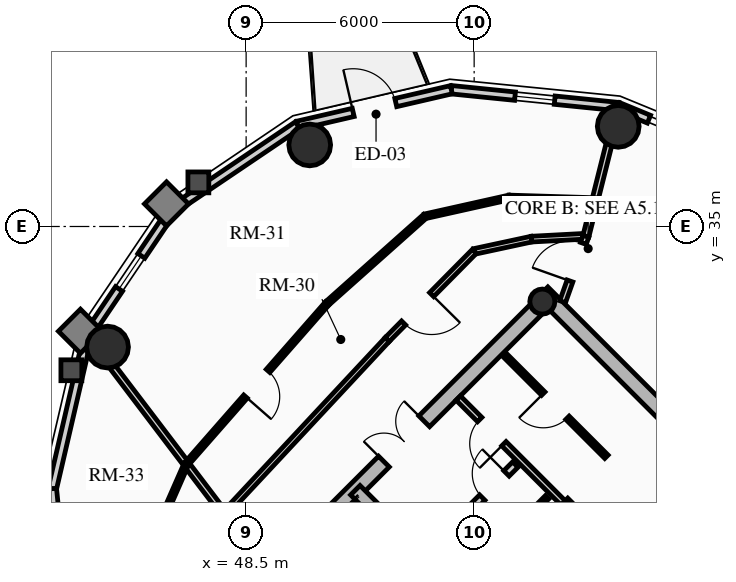
"""IFC4 building model, lengths in metres.
Left out: names, types, materials, properties, quantities, classifications, styles, units other than length and angle.
Written with IfcOpenShell. Run it as: python <this file> out.ifc"""

import sys

from ifc_helpers import new_model, si_unit, direction, frame, frame_2d, origin, origin_2d, place, context, subcontext, project, spatial, rectangle, circle, hollow_circle, extrude, source, transform, mapped, element, fill, save


model = new_model("IFC4")
c1 = context("Model", 3, precision=1e-05, world=origin(), true_north=direction((0.0, 1.0)))
c2 = subcontext(c1, "Body", "Model", "MODEL_VIEW")
j1 = project(units=[si_unit("LENGTHUNIT", "METRE"), si_unit("PLANEANGLEUNIT", "RADIAN")], contexts=[c1])
p1 = place(None, origin())
s1 = spatial("IfcSite", under=j1, at=p1, CompositionType="ELEMENT")
p2 = place(p1, origin())
s2 = spatial("IfcBuilding", under=s1, at=p2, CompositionType="ELEMENT")
p3 = place(p2, frame((0.0, 0.0, 226.05)))
s3 = spatial("IfcBuildingStorey", under=s2, at=p3, CompositionType="ELEMENT", Elevation=226.05)
p4 = place(p3, frame((66.268, 23.298, 0.0), z_axis=(0.0, 0.0, 1.0), x_axis=(-0.707106781187, 0.707106781187, 0.0)))
e1 = element("IfcWall", 1, at=p4, inside=s3, PredefinedType="SHEAR", context=c2, shape_type="SweptSolid", body=[
    extrude(rectangle(XDim=14.1, YDim=0.4, at=frame_2d((7.05, 0.0))), origin(), (0.0, 0.0, 1.0), 3.2),
])
p5 = place(p3, frame((48.873, 25.561, 0.0), z_axis=(0.0, 0.0, 1.0), x_axis=(0.707106781187, 0.707106781187, 0.0)))
e2 = element("IfcWall", 2, at=p5, inside=s3, PredefinedType="SHEAR", context=c2, shape_type="SweptSolid", body=[
    extrude(rectangle(XDim=10.7, YDim=0.4, at=frame_2d((5.35, 0.0))), origin(), (0.0, 0.0, 1.0), 3.2),
])
m1 = source(origin(), c2, "Body", "SweptSolid", [
    extrude(rectangle(XDim=1.5, YDim=2.02, at=frame_2d((0.75, 1.01))), frame((0.0, 0.21, 0.0), z_axis=(0.0, -1.0, 0.0), x_axis=(1.0, 0.0, 0.0)), (0.0, 0.0, 1.0), 0.42),
])
p6 = place(p5, frame((4.6, 0.0, 0.0)))
e3 = element("IfcOpeningElement", 3, at=p6, cuts=e2, PredefinedType="OPENING", context=c2, shape_type="MappedRepresentation", body=[
    mapped(m1, transform((0.0, 0.0, 0.0), x_axis=(1.0, 0.0, 0.0), y_axis=(0.0, 1.0, 0.0), z_axis=(0.0, 0.0, 1.0), scale=1.0)),
])
p7 = place(p3, frame((61.06, 18.373, 0.0), z_axis=(0.0, 0.0, 1.0), x_axis=(-0.707106781187, 0.707106781187, 0.0)))
e4 = element("IfcWall", 4, at=p7, inside=s3, PredefinedType="SHEAR", context=c2, shape_type="SweptSolid", body=[
    extrude(rectangle(XDim=13.7, YDim=0.35, at=frame_2d((6.85, 0.0))), origin(), (0.0, 0.0, 1.0), 3.2),
])
m2 = source(origin(), c2, "Body", "SweptSolid", [
    extrude(rectangle(XDim=1.1, YDim=2.015, at=frame_2d((0.55, 1.007))), frame((0.0, 0.185, 0.0), z_axis=(0.0, -1.0, 0.0), x_axis=(1.0, 0.0, 0.0)), (0.0, 0.0, 1.0), 0.37),
])
p8 = place(p7, frame((4.85, 0.0, 0.0)))
e5 = element("IfcOpeningElement", 5, at=p8, cuts=e4, PredefinedType="OPENING", context=c2, shape_type="MappedRepresentation", body=[
    mapped(m2, transform((0.0, 0.0, 0.0), x_axis=(1.0, 0.0, 0.0), y_axis=(0.0, 1.0, 0.0), z_axis=(0.0, 0.0, 1.0), scale=1.0)),
])
p9 = place(p7, frame((0.625, 0.0, 0.0)))
e6 = element("IfcOpeningElement", 6, at=p9, cuts=e4, PredefinedType="OPENING", context=c2, shape_type="MappedRepresentation", body=[
    mapped(m2, transform((0.0, 0.0, 0.0), x_axis=(1.0, 0.0, 0.0), y_axis=(0.0, 1.0, 0.0), z_axis=(0.0, 0.0, 1.0), scale=1.0)),
])
p10 = place(p7, frame((2.625, 0.0, 0.0)))
e7 = element("IfcOpeningElement", 7, at=p10, cuts=e4, PredefinedType="OPENING", context=c2, shape_type="MappedRepresentation", body=[
    mapped(m2, transform((0.0, 0.0, 0.0), x_axis=(1.0, 0.0, 0.0), y_axis=(0.0, 1.0, 0.0), z_axis=(0.0, 0.0, 1.0), scale=1.0)),
])
m3 = source(origin(), c2, "Body", "SweptSolid", [
    extrude(rectangle(XDim=1.15, YDim=2.02, at=frame_2d((0.575, 1.01))), frame((0.0, 0.185, 0.0), z_axis=(0.0, -1.0, 0.0), x_axis=(1.0, 0.0, 0.0)), (0.0, 0.0, 1.0), 0.37),
])
p11 = place(p7, frame((7.27, 0.0, 0.0)))
e8 = element("IfcOpeningElement", 8, at=p11, cuts=e4, PredefinedType="OPENING", context=c2, shape_type="MappedRepresentation", body=[
    mapped(m3, transform((0.0, 0.0, 0.0), x_axis=(1.0, 0.0, 0.0), y_axis=(0.0, 1.0, 0.0), z_axis=(0.0, 0.0, 1.0), scale=1.0)),
])
p12 = place(p3, frame((63.627, 20.94, 0.0), z_axis=(0.0, 0.0, 1.0), x_axis=(-0.707119496762, 0.707094065383, 0.0)))
e9 = element("IfcWall", 9, at=p12, inside=s3, PredefinedType="SHEAR", context=c2, shape_type="SweptSolid", body=[
    extrude(rectangle(XDim=9.6, YDim=0.35, at=frame_2d((4.8, 0.0))), origin(), (0.0, 0.0, 1.0), 3.2),
])
p13 = place(p12, frame((5.28, 0.0, 0.0)))
e10 = element("IfcOpeningElement", 10, at=p13, cuts=e9, PredefinedType="OPENING", context=c2, shape_type="MappedRepresentation", body=[
    mapped(m3, transform((0.0, 0.0, 0.0), x_axis=(1.0, 0.0, 0.0), y_axis=(0.0, 1.0, 0.0), z_axis=(0.0, 0.0, 1.0), scale=1.0)),
])
p14 = place(p3, frame((58.893, 25.674, 0.0), z_axis=(0.0, 0.0, 1.0), x_axis=(0.707106781187, 0.707106781187, 0.0)))
e11 = element("IfcWall", 11, at=p14, inside=s3, PredefinedType="SHEAR", context=c2, shape_type="SweptSolid", body=[
    extrude(rectangle(XDim=3.285, YDim=0.35, at=frame_2d((1.643, 0.0))), origin(), (0.0, 0.0, 1.0), 3.2),
])
p15 = place(p3, frame((56.294, 33.024, 0.0), z_axis=(0.0, 0.0, 1.0), x_axis=(0.707106781187, 0.707106781187, 0.0)))
e12 = element("IfcColumn", 12, at=p15, inside=s3, PredefinedType="COLUMN", context=c2, shape_type="SweptSolid", body=[
    extrude(hollow_circle(Radius=0.33, WallThickness=0.025, at=origin_2d()), origin(), (0.0, 0.0, 1.0), 3.2),
])
for number, where, z_axis, x_axis in (
    (13, (58.291, 37.635, 0.0), (0.0, 0.0, 1.0), (1.0, 0.0, 0.0)),
    (14, (50.173, 37.146, 0.0), (0.0, 0.0, 1.0), (1.0, 0.0, 0.0)),
    (15, (44.854, 31.827, 0.0), (0.0, 0.0, 1.0), (1.0, 0.0, 0.0)),
):
    element("IfcColumn", number, at=place(p3, frame(where, z_axis=z_axis, x_axis=x_axis)), inside=s3, PredefinedType="USERDEFINED", context=c2, shape_type="SweptSolid", body=[
        extrude(circle(Radius=0.55, at=origin_2d()), origin(), (0.0, 0.0, 1.0), 3.2),
    ])
p16 = place(p3, frame((58.295, 38.155, 0.0), z_axis=(0.0, 0.0, 1.0), x_axis=(0.924515260676, -0.381145028536, 0.0)))
e16 = element("IfcWall", 16, at=p16, inside=s3, PredefinedType="SOLIDWALL", context=c2, shape_type="SweptSolid", body=[
    extrude(rectangle(XDim=0.87, YDim=0.22, at=frame_2d((0.435, 0.0))), origin(), (0.0, 0.0, 1.0), 2.612),
])
p17 = place(p3, frame((53.9, 38.599, 0.0), z_axis=(0.0, 0.0, 1.0), x_axis=(0.994929930991, -0.100570534541, 0.0)))
e17 = element("IfcWall", 17, at=p17, inside=s3, PredefinedType="SOLIDWALL", context=c2, shape_type="SweptSolid", body=[
    extrude(rectangle(XDim=4.418, YDim=0.22, at=frame_2d((2.209, 0.0))), origin(), (0.0, 0.0, 1.0), 2.612),
])
m4 = source(origin(), c2, "Body", "SweptSolid", [
    extrude(rectangle(XDim=1.05, YDim=1.3, at=frame_2d((0.525, 0.65))), frame((0.0, 0.12, 0.0), z_axis=(0.0, -1.0, 0.0), x_axis=(1.0, 0.0, 0.0)), (0.0, 0.0, 1.0), 0.24),
])
p18 = place(p17, frame((1.684, 0.0, 0.65)))
e18 = element("IfcOpeningElement", 18, at=p18, cuts=e17, PredefinedType="OPENING", context=c2, shape_type="MappedRepresentation", body=[
    mapped(m4, transform((0.0, 0.0, 0.0), x_axis=(1.0, 0.0, 0.0), y_axis=(0.0, 1.0, 0.0), z_axis=(0.0, 0.0, 1.0), scale=1.0)),
])
p19 = place(p3, frame((49.856, 37.663, 0.0), z_axis=(0.0, 0.0, 1.0), x_axis=(0.974249228678, 0.225473813158, 0.0)))
e19 = element("IfcWall", 19, at=p19, inside=s3, PredefinedType="SOLIDWALL", context=c2, shape_type="SweptSolid", body=[
    extrude(rectangle(XDim=4.15, YDim=0.22, at=frame_2d((2.075, 0.0))), origin(), (0.0, 0.0, 1.0), 2.612),
])
m5 = source(origin(), c2, "Body", "SweptSolid", [
    extrude(rectangle(XDim=1.15, YDim=2.005, at=frame_2d((0.575, 1.002))), frame((0.0, 0.12, 0.0), z_axis=(0.0, -1.0, 0.0), x_axis=(1.0, 0.0, 0.0)), (0.0, 0.0, 1.0), 0.24),
])
p20 = place(p19, frame((1.5, 0.0, 0.0)))
e20 = element("IfcOpeningElement", 20, at=p20, cuts=e19, PredefinedType="OPENING", context=c2, shape_type="MappedRepresentation", body=[
    mapped(m5, transform((0.0, 0.0, 0.0), x_axis=(1.0, 0.0, 0.0), y_axis=(0.0, 1.0, 0.0), z_axis=(0.0, 0.0, 1.0), scale=1.0)),
])
p21 = place(p3, frame((46.561, 35.439, 0.0), z_axis=(0.0, 0.0, 1.0), x_axis=(0.828833723692, 0.559495003079, 0.0)))
e21 = element("IfcWall", 21, at=p21, inside=s3, PredefinedType="SOLIDWALL", context=c2, shape_type="SweptSolid", body=[
    extrude(rectangle(XDim=3.976, YDim=0.22, at=frame_2d((1.988, 0.0))), origin(), (0.0, 0.0, 1.0), 2.612),
])
p22 = place(p3, frame((44.337, 32.144, 0.0), z_axis=(0.0, 0.0, 1.0), x_axis=(0.559495003079, 0.828833723692, 0.0)))
e22 = element("IfcWall", 22, at=p22, inside=s3, PredefinedType="SOLIDWALL", context=c2, shape_type="SweptSolid", body=[
    extrude(rectangle(XDim=3.976, YDim=0.22, at=frame_2d((1.988, 0.0))), origin(), (0.0, 0.0, 1.0), 2.612),
])
p23 = place(p22, frame((1.463, 0.0, 0.65)))
e23 = element("IfcOpeningElement", 23, at=p23, cuts=e22, PredefinedType="OPENING", context=c2, shape_type="MappedRepresentation", body=[
    mapped(m4, transform((0.0, 0.0, 0.0), x_axis=(1.0, 0.0, 0.0), y_axis=(0.0, 1.0, 0.0), z_axis=(0.0, 0.0, 1.0), scale=1.0)),
])
p24 = place(p3, frame((43.401, 28.1, 0.0), z_axis=(0.0, 0.0, 1.0), x_axis=(0.225473813158, 0.974249228678, 0.0)))
e24 = element("IfcWall", 24, at=p24, inside=s3, PredefinedType="SOLIDWALL", context=c2, shape_type="SweptSolid", body=[
    extrude(rectangle(XDim=4.15, YDim=0.22, at=frame_2d((2.075, 0.0))), origin(), (0.0, 0.0, 1.0), 2.612),
])
p25 = place(p3, frame((43.845, 23.705, 0.0), z_axis=(0.0, 0.0, 1.0), x_axis=(-0.100570534541, 0.994929930991, 0.0)))
e25 = element("IfcWall", 25, at=p25, inside=s3, PredefinedType="SOLIDWALL", context=c2, shape_type="SweptSolid", body=[
    extrude(rectangle(XDim=4.418, YDim=0.22, at=frame_2d((2.209, 0.0))), origin(), (0.0, 0.0, 1.0), 2.612),
])
p26 = place(p25, frame((1.684, 0.0, 0.65)))
e26 = element("IfcOpeningElement", 26, at=p26, cuts=e25, PredefinedType="OPENING", context=c2, shape_type="MappedRepresentation", body=[
    mapped(m4, transform((0.0, 0.0, 0.0), x_axis=(1.0, 0.0, 0.0), y_axis=(0.0, 1.0, 0.0), z_axis=(0.0, 0.0, 1.0), scale=1.0)),
])
p27 = place(p3, frame((53.264, 26.416, 0.0), z_axis=(0.0, 0.0, 1.0), x_axis=(0.707106781187, 0.707106781187, 0.0)))
e27 = element("IfcWall", 27, at=p27, inside=s3, PredefinedType="PARTITIONING", context=c2, shape_type="SweptSolid", body=[
    extrude(rectangle(XDim=3.28, YDim=0.2, at=frame_2d((1.64, 0.0))), origin(), (0.0, 0.0, 1.0), 2.975),
])
m6 = source(origin(), c2, "Body", "SweptSolid", [
    extrude(rectangle(XDim=1.0, YDim=2.015, at=frame_2d((0.5, 1.007))), frame((0.0, 0.11, 0.0), z_axis=(0.0, -1.0, 0.0), x_axis=(1.0, 0.0, 0.0)), (0.0, 0.0, 1.0), 0.22),
])
p28 = place(p27, frame((0.14, 0.0, 0.0)))
e28 = element("IfcOpeningElement", 28, at=p28, cuts=e27, PredefinedType="OPENING", context=c2, shape_type="MappedRepresentation", body=[
    mapped(m6, transform((0.0, 0.0, 0.0), x_axis=(1.0, 0.0, 0.0), y_axis=(0.0, 1.0, 0.0), z_axis=(0.0, 0.0, 1.0), scale=1.0)),
])
m7 = source(origin(), c2, "Body", "SweptSolid", [
    extrude(rectangle(XDim=0.9, YDim=2.005, at=frame_2d((0.45, 1.002))), frame((0.0, 0.11, 0.0), z_axis=(0.0, -1.0, 0.0), x_axis=(1.0, 0.0, 0.0)), (0.0, 0.0, 1.0), 0.22),
])
p29 = place(p27, frame((2.05, 0.0, 0.0)))
e29 = element("IfcOpeningElement", 29, at=p29, cuts=e27, PredefinedType="OPENING", context=c2, shape_type="MappedRepresentation", body=[
    mapped(m7, transform((0.0, 0.0, 0.0), x_axis=(1.0, 0.0, 0.0), y_axis=(0.0, 1.0, 0.0), z_axis=(0.0, 0.0, 1.0), scale=1.0)),
])
p30 = place(p3, frame((55.089, 26.543, 0.0), z_axis=(0.0, 0.0, 1.0), x_axis=(0.707106781187, 0.707106781187, 0.0)))
e30 = element("IfcWall", 30, at=p30, inside=s3, PredefinedType="PARTITIONING", context=c2, shape_type="SweptSolid", body=[
    extrude(rectangle(XDim=1.88, YDim=0.125, at=frame_2d((0.94, 0.0))), origin(), (0.0, 0.0, 1.0), 2.975),
])
p31 = place(p3, frame((56.839, 27.728, 0.0), z_axis=(0.0, 0.0, 1.0), x_axis=(-0.707106781187, 0.707106781187, 0.0)))
e31 = element("IfcWall", 31, at=p31, inside=s3, PredefinedType="PARTITIONING", context=c2, shape_type="SweptSolid", body=[
    extrude(rectangle(XDim=3.9, YDim=0.16, at=frame_2d((1.95, 0.0))), origin(), (0.0, 0.0, 1.0), 2.975),
])
m8 = source(origin(), c2, "Body", "SweptSolid", [
    extrude(rectangle(XDim=0.9, YDim=2.005, at=frame_2d((0.45, 1.002))), frame((0.0, 0.09, 0.0), z_axis=(0.0, -1.0, 0.0), x_axis=(1.0, 0.0, 0.0)), (0.0, 0.0, 1.0), 0.18),
])
p32 = place(p31, frame((2.2, 0.0, 0.0)))
e32 = element("IfcOpeningElement", 32, at=p32, cuts=e31, PredefinedType="OPENING", context=c2, shape_type="MappedRepresentation", body=[
    mapped(m8, transform((0.0, 0.0, 0.0), x_axis=(1.0, 0.0, 0.0), y_axis=(0.0, 1.0, 0.0), z_axis=(0.0, 0.0, 1.0), scale=1.0)),
])
p33 = place(p3, frame((57.981, 28.941, 0.0), z_axis=(0.0, 0.0, 1.0), x_axis=(-0.707074823725, 0.707138737204, 0.0)))
e33 = element("IfcWall", 33, at=p33, inside=s3, PredefinedType="PARTITIONING", context=c2, shape_type="SweptSolid", body=[
    extrude(rectangle(XDim=3.82, YDim=0.125, at=frame_2d((1.91, 0.0))), origin(), (0.0, 0.0, 1.0), 2.975),
])
m9 = source(origin(), c2, "Body", "SweptSolid", [
    extrude(rectangle(XDim=0.9, YDim=2.005, at=frame_2d((0.45, 1.002))), frame((0.0, 0.073, 0.0), z_axis=(0.0, -1.0, 0.0), x_axis=(1.0, 0.0, 0.0)), (0.0, 0.0, 1.0), 0.145),
])
p34 = place(p33, frame((1.45, 0.0, 0.0)))
e34 = element("IfcOpeningElement", 34, at=p34, cuts=e33, PredefinedType="OPENING", context=c2, shape_type="MappedRepresentation", body=[
    mapped(m9, transform((0.0, 0.0, 0.0), x_axis=(1.0, 0.0, 0.0), y_axis=(0.0, 1.0, 0.0), z_axis=(0.0, 0.0, 1.0), scale=1.0)),
])
p35 = place(p3, frame((57.44, 34.744, 0.0), z_axis=(0.0, 0.0, 1.0), x_axis=(-0.998578025565, -0.053309725738, 0.0)))
e35 = element("IfcWall", 35, at=p35, inside=s3, PredefinedType="PARTITIONING", context=c2, shape_type="SweptSolid", body=[
    extrude(rectangle(XDim=1.433, YDim=0.15, at=frame_2d((0.717, 0.0))), origin(), (0.0, 0.0, 1.0), 2.612),
])
p36 = place(p3, frame((56.009, 34.667, 0.0), z_axis=(0.0, 0.0, 1.0), x_axis=(-0.977625498152, -0.210353001795, 0.0)))
e36 = element("IfcWall", 36, at=p36, inside=s3, PredefinedType="PARTITIONING", context=c2, shape_type="SweptSolid", body=[
    extrude(rectangle(XDim=1.538, YDim=0.15, at=frame_2d((0.769, 0.0))), origin(), (0.0, 0.0, 1.0), 2.545),
])
p37 = place(p3, frame((54.506, 34.344, 0.0), z_axis=(0.0, 0.0, 1.0), x_axis=(-0.703053402247, -0.711137056824, 0.0)))
e37 = element("IfcWall", 37, at=p37, inside=s3, PredefinedType="PARTITIONING", context=c2, shape_type="SweptSolid", body=[
    extrude(rectangle(XDim=3.262, YDim=0.15, at=frame_2d((1.631, 0.0))), origin(), (0.0, 0.0, 1.0), 2.612),
])
m10 = source(origin(), c2, "Body", "SweptSolid", [
    extrude(rectangle(XDim=1.05, YDim=2.015, at=frame_2d((0.525, 1.007))), frame((0.0, 0.085, 0.0), z_axis=(0.0, -1.0, 0.0), x_axis=(1.0, 0.0, 0.0)), (0.0, 0.0, 1.0), 0.17),
])
p38 = place(p37, frame((1.599, 0.0, 0.0)))
e38 = element("IfcOpeningElement", 38, at=p38, cuts=e37, PredefinedType="OPENING", context=c2, shape_type="MappedRepresentation", body=[
    mapped(m10, transform((0.0, 0.0, 0.0), x_axis=(1.0, 0.0, 0.0), y_axis=(0.0, 1.0, 0.0), z_axis=(0.0, 0.0, 1.0), scale=1.0)),
])
p39 = place(p3, frame((52.212, 32.024, 0.0), z_axis=(0.0, 0.0, 1.0), x_axis=(-0.682158998173, -0.731203871169, 0.0)))
e39 = element("IfcWall", 39, at=p39, inside=s3, PredefinedType="PARTITIONING", context=c2, shape_type="SweptSolid", body=[
    extrude(rectangle(XDim=6.282, YDim=0.15, at=frame_2d((3.141, 0.0))), origin(), (0.0, 0.0, 1.0), 2.545),
])
p40 = place(p3, frame((57.44, 34.744, 0.0), z_axis=(0.0, 0.0, 1.0), x_axis=(0.243619816457, 0.969870808422, 0.0)))
e40 = element("IfcWall", 40, at=p40, inside=s3, PredefinedType="PARTITIONING", context=c2, shape_type="SweptSolid", body=[
    extrude(rectangle(XDim=3.496, YDim=0.16, at=frame_2d((1.748, 0.0))), origin(), (0.0, 0.0, 1.0), 2.612),
])
p41 = place(p3, frame((47.927, 27.431, 0.0), z_axis=(0.0, 0.0, 1.0), x_axis=(-0.604823333103, 0.796359677366, 0.0)))
e41 = element("IfcWall", 41, at=p41, inside=s3, PredefinedType="PARTITIONING", context=c2, shape_type="SweptSolid", body=[
    extrude(rectangle(XDim=5.907, YDim=0.16, at=frame_2d((2.953, 0.0))), origin(), (0.0, 0.0, 1.0), 2.612),
])
p42 = place(p3, frame((56.828, 33.021, 0.0), z_axis=(0.0, 0.0, 1.0), x_axis=(0.334788446034, 0.942293317605, 0.0)))
e42 = element("IfcWall", 42, at=p42, inside=s3, PredefinedType="PARTITIONING", context=c2, shape_type="SweptSolid", body=[
    extrude(rectangle(XDim=1.829, YDim=0.16, at=frame_2d((0.915, 0.0))), origin(), (0.0, 0.0, 1.0), 2.545),
])
m11 = source(origin(), c2, "Body", "SweptSolid", [
    extrude(rectangle(XDim=1.05, YDim=2.015, at=frame_2d((0.525, 1.007))), frame((0.0, 0.09, 0.0), z_axis=(0.0, -1.0, 0.0), x_axis=(1.0, 0.0, 0.0)), (0.0, 0.0, 1.0), 0.18),
])
p43 = place(p42, frame((0.579, 0.0, 0.0)))
e43 = element("IfcOpeningElement", 43, at=p43, cuts=e42, PredefinedType="OPENING", context=c2, shape_type="MappedRepresentation", body=[
    mapped(m11, transform((0.0, 0.0, 0.0), x_axis=(1.0, 0.0, 0.0), y_axis=(0.0, 1.0, 0.0), z_axis=(0.0, 0.0, 1.0), scale=1.0)),
])
p44 = place(p3, frame((57.679, 35.693, 0.0), z_axis=(0.0, 0.0, 1.0), x_axis=(-0.999526298938, 0.030776252722, 0.0)))
e44 = element("IfcWall", 44, at=p44, inside=s3, PredefinedType="PARTITIONING", context=c2, shape_type="SweptSolid", body=[
    extrude(rectangle(XDim=2.261, YDim=0.125, at=frame_2d((1.13, 0.0))), origin(), (0.0, 0.0, 1.0), 2.612),
])
p45 = place(p3, frame((55.419, 35.763, 0.0), z_axis=(0.0, 0.0, 1.0), x_axis=(-0.975917771425, -0.218138725166, 0.0)))
e45 = element("IfcWall", 45, at=p45, inside=s3, PredefinedType="PARTITIONING", context=c2, shape_type="SweptSolid", body=[
    extrude(rectangle(XDim=2.268, YDim=0.125, at=frame_2d((1.134, 0.0))), origin(), (0.0, 0.0, 1.0), 2.545),
])
p46 = place(p3, frame((53.206, 35.268, 0.0), z_axis=(0.0, 0.0, 1.0), x_axis=(-0.746677760999, -0.665185929819, 0.0)))
e46 = element("IfcWall", 46, at=p46, inside=s3, PredefinedType="PARTITIONING", context=c2, shape_type="SweptSolid", body=[
    extrude(rectangle(XDim=3.445, YDim=0.125, at=frame_2d((1.723, 0.0))), origin(), (0.0, 0.0, 1.0), 2.612),
])
p47 = place(p3, frame((50.634, 32.977, 0.0), z_axis=(0.0, 0.0, 1.0), x_axis=(-0.659241945747, -0.751930885765, 0.0)))
e47 = element("IfcWall", 47, at=p47, inside=s3, PredefinedType="PARTITIONING", context=c2, shape_type="SweptSolid", body=[
    extrude(rectangle(XDim=5.624, YDim=0.125, at=frame_2d((2.812, 0.0))), origin(), (0.0, 0.0, 1.0), 2.545),
])
p48 = place(p47, frame((2.362, 0.0, 0.0)))
e48 = element("IfcOpeningElement", 48, at=p48, cuts=e47, PredefinedType="OPENING", context=c2, shape_type="MappedRepresentation", body=[
    mapped(m9, transform((0.0, 0.0, 0.0), x_axis=(1.0, 0.0, 0.0), y_axis=(0.0, 1.0, 0.0), z_axis=(0.0, 0.0, 1.0), scale=1.0)),
])
p49 = place(p3, frame((46.927, 28.748, 0.0), z_axis=(0.0, 0.0, 1.0), x_axis=(-0.401820136661, -0.91571861277, 0.0)))
e49 = element("IfcWall", 49, at=p49, inside=s3, PredefinedType="PARTITIONING", context=c2, shape_type="SweptSolid", body=[
    extrude(rectangle(XDim=2.468, YDim=0.125, at=frame_2d((1.234, 0.0))), origin(), (0.0, 0.0, 1.0), 2.545),
])
m12 = source(origin(), c2, "Body", "SweptSolid", [
    extrude(rectangle(XDim=1.05, YDim=1.3, at=frame_2d((0.525, 0.65))), frame((0.0, 0.03, 0.0), z_axis=(0.0, -1.0, 0.0), x_axis=(1.0, 0.0, 0.0)), (0.0, 0.0, 1.0), 0.06),
])
p50 = place(p18, origin())
e50 = element("IfcWindow", 50, at=p50, inside=s3, PartitioningType="SINGLE_PANEL", PredefinedType="WINDOW", context=c2, shape_type="MappedRepresentation", body=[
    mapped(m12, transform((0.0, 0.0, 0.0), x_axis=(1.0, 0.0, 0.0), y_axis=(0.0, 1.0, 0.0), z_axis=(0.0, 0.0, 1.0), scale=1.0)),
])
fill(e18, e50)
m13 = source(origin(), c2, "Body", "SweptSolid", [
    extrude(rectangle(XDim=1.15, YDim=2.005, at=frame_2d((0.575, 1.002))), frame((0.0, 0.025, 0.0), z_axis=(0.0, -1.0, 0.0), x_axis=(1.0, 0.0, 0.0)), (0.0, 0.0, 1.0), 0.05),
])
p51 = place(p20, origin())
e51 = element("IfcDoor", 51, at=p51, inside=s3, OperationType="SINGLE_SWING_LEFT", PredefinedType="DOOR", context=c2, shape_type="MappedRepresentation", body=[
    mapped(m13, transform((0.0, 0.0, 0.0), x_axis=(1.0, 0.0, 0.0), y_axis=(0.0, 1.0, 0.0), z_axis=(0.0, 0.0, 1.0), scale=1.0)),
])
fill(e20, e51)
p52 = place(p23, origin())
e52 = element("IfcWindow", 52, at=p52, inside=s3, PartitioningType="SINGLE_PANEL", PredefinedType="WINDOW", context=c2, shape_type="MappedRepresentation", body=[
    mapped(m12, transform((0.0, 0.0, 0.0), x_axis=(1.0, 0.0, 0.0), y_axis=(0.0, 1.0, 0.0), z_axis=(0.0, 0.0, 1.0), scale=1.0)),
])
fill(e23, e52)
m14 = source(origin(), c2, "Body", "SweptSolid", [
    extrude(rectangle(XDim=1.5, YDim=2.02, at=frame_2d((0.75, 1.01))), frame((0.0, 0.025, 0.0), z_axis=(0.0, -1.0, 0.0), x_axis=(1.0, 0.0, 0.0)), (0.0, 0.0, 1.0), 0.05),
])
p53 = place(p6, origin())
e53 = element("IfcDoor", 53, at=p53, inside=s3, OperationType="DOUBLE_DOOR_SINGLE_SWING", PredefinedType="DOOR", context=c2, shape_type="MappedRepresentation", body=[
    mapped(m14, transform((0.0, 0.0, 0.0), x_axis=(1.0, 0.0, 0.0), y_axis=(0.0, 1.0, 0.0), z_axis=(0.0, 0.0, 1.0), scale=1.0)),
])
fill(e3, e53)
m15 = source(origin(), c2, "Body", "SweptSolid", [
    extrude(rectangle(XDim=0.9, YDim=2.005, at=frame_2d((0.45, 1.002))), frame((0.0, 0.025, 0.0), z_axis=(0.0, -1.0, 0.0), x_axis=(1.0, 0.0, 0.0)), (0.0, 0.0, 1.0), 0.05),
])
p54 = place(p29, origin())
e54 = element("IfcDoor", 54, at=p54, inside=s3, OperationType="SINGLE_SWING_RIGHT", PredefinedType="DOOR", context=c2, shape_type="MappedRepresentation", body=[
    mapped(m15, transform((0.0, 0.0, 0.0), x_axis=(1.0, 0.0, 0.0), y_axis=(0.0, 1.0, 0.0), z_axis=(0.0, 0.0, 1.0), scale=1.0)),
])
fill(e29, e54)
p55 = place(p32, origin())
e55 = element("IfcDoor", 55, at=p55, inside=s3, OperationType="SINGLE_SWING_LEFT", PredefinedType="DOOR", context=c2, shape_type="MappedRepresentation", body=[
    mapped(m15, transform((0.0, 0.0, 0.0), x_axis=(1.0, 0.0, 0.0), y_axis=(0.0, 1.0, 0.0), z_axis=(0.0, 0.0, 1.0), scale=1.0)),
])
fill(e32, e55)
p56 = place(p34, origin())
e56 = element("IfcDoor", 56, at=p56, inside=s3, OperationType="SINGLE_SWING_RIGHT", PredefinedType="DOOR", context=c2, shape_type="MappedRepresentation", body=[
    mapped(m15, transform((0.0, 0.0, 0.0), x_axis=(1.0, 0.0, 0.0), y_axis=(0.0, 1.0, 0.0), z_axis=(0.0, 0.0, 1.0), scale=1.0)),
])
fill(e34, e56)
m16 = source(origin(), c2, "Body", "SweptSolid", [
    extrude(rectangle(XDim=1.05, YDim=2.015, at=frame_2d((0.525, 1.007))), frame((0.0, 0.025, 0.0), z_axis=(0.0, -1.0, 0.0), x_axis=(1.0, 0.0, 0.0)), (0.0, 0.0, 1.0), 0.05),
])
p57 = place(p43, origin())
e57 = element("IfcDoor", 57, at=p57, inside=s3, OperationType="SINGLE_SWING_LEFT", PredefinedType="DOOR", context=c2, shape_type="MappedRepresentation", body=[
    mapped(m16, transform((0.0, 0.0, 0.0), x_axis=(1.0, 0.0, 0.0), y_axis=(0.0, 1.0, 0.0), z_axis=(0.0, 0.0, 1.0), scale=1.0)),
])
fill(e43, e57)
p58 = place(p38, origin())
e58 = element("IfcDoor", 58, at=p58, inside=s3, OperationType="SINGLE_SWING_LEFT", PredefinedType="DOOR", context=c2, shape_type="MappedRepresentation", body=[
    mapped(m16, transform((0.0, 0.0, 0.0), x_axis=(1.0, 0.0, 0.0), y_axis=(0.0, 1.0, 0.0), z_axis=(0.0, 0.0, 1.0), scale=1.0)),
])
fill(e38, e58)
p59 = place(p48, origin())
e59 = element("IfcDoor", 59, at=p59, inside=s3, OperationType="SINGLE_SWING_RIGHT", PredefinedType="DOOR", context=c2, shape_type="MappedRepresentation", body=[
    mapped(m15, transform((0.0, 0.0, 0.0), x_axis=(1.0, 0.0, 0.0), y_axis=(0.0, 1.0, 0.0), z_axis=(0.0, 0.0, 1.0), scale=1.0)),
])
fill(e48, e59)
save(model, sys.argv[1])
